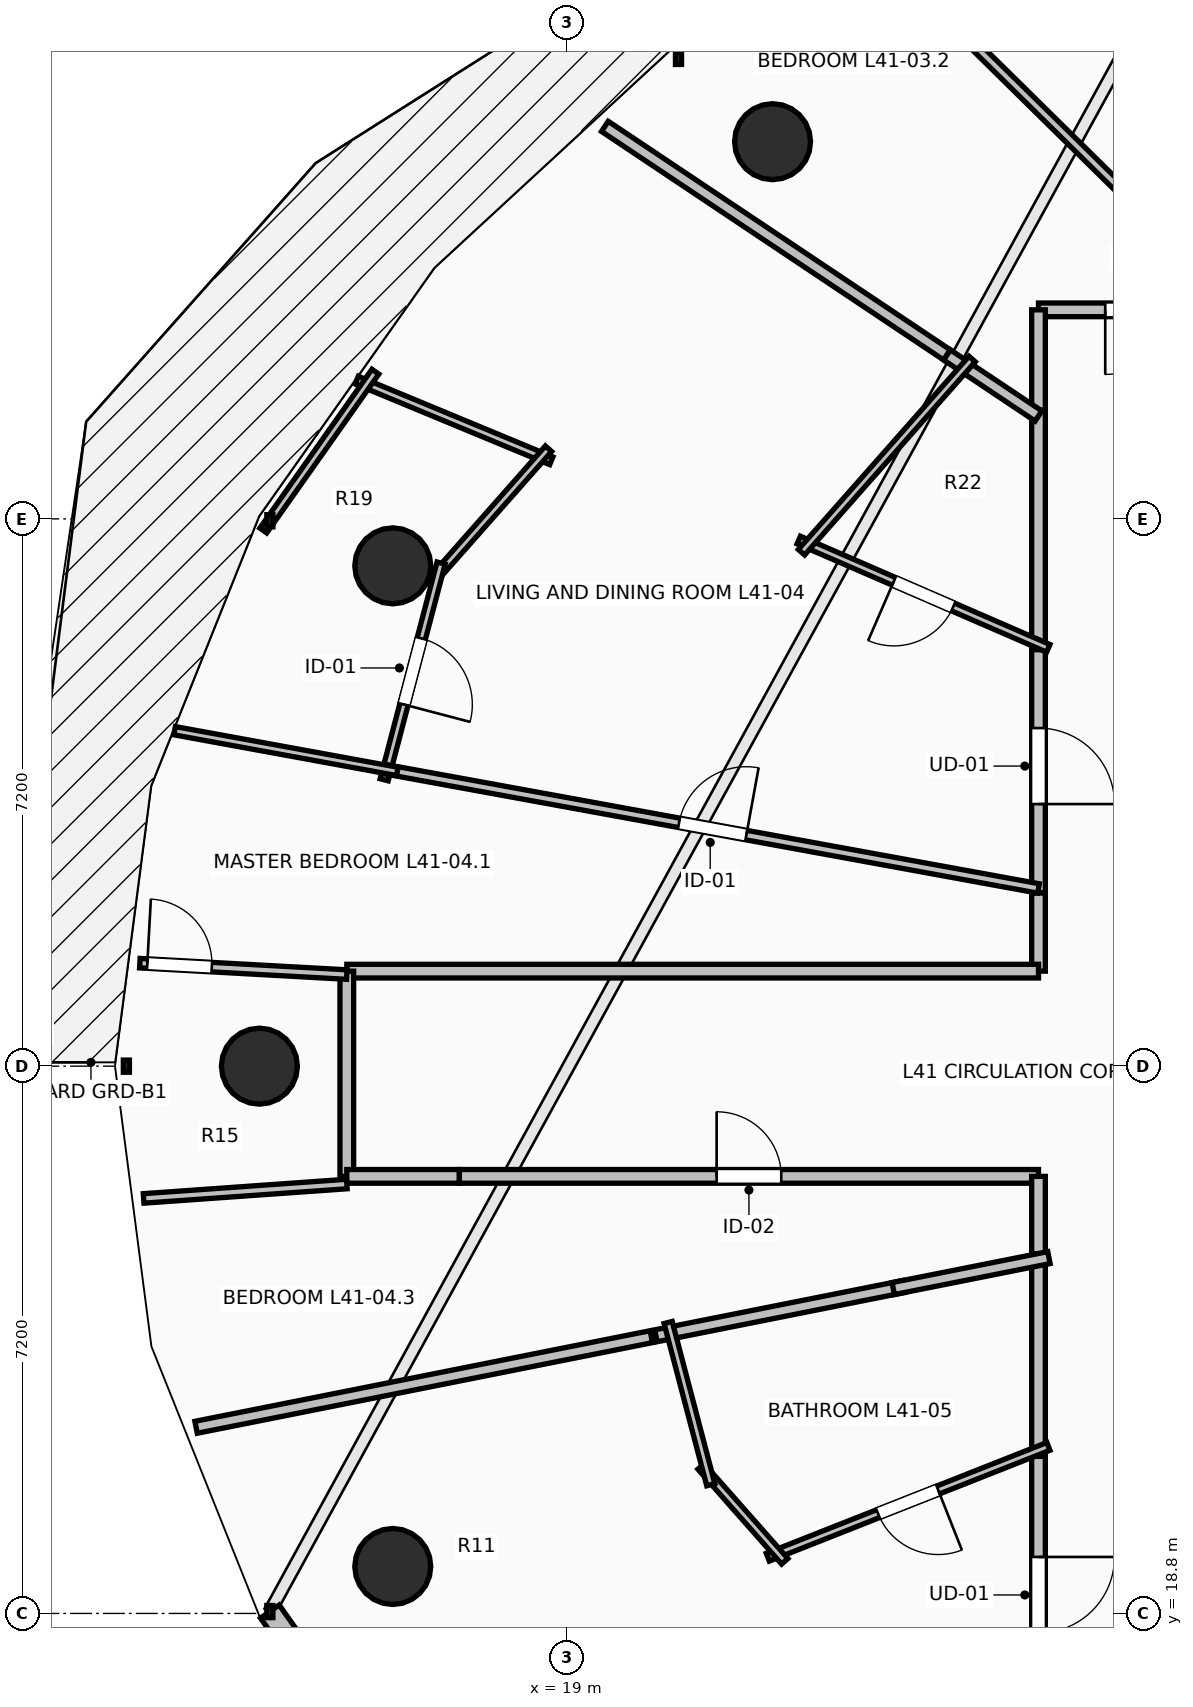
"""IFC4 building model, lengths in metres.
Left out: names, types, materials, properties, quantities, classifications, styles, units other than length and angle.
Written with IfcOpenShell. Run it as: python <this file> out.ifc"""

import sys

from ifc_helpers import new_model, si_unit, direction, frame, frame_2d, origin, origin_2d, place, context, subcontext, project, spatial, rectangle, circle, extrude, element, fill, save


model = new_model("IFC4")
c1 = context("Model", 3, precision=1e-05, world=origin(), true_north=direction((0.0, 1.0)))
c2 = subcontext(c1, "Body", "Model", "MODEL_VIEW")
j1 = project(units=[si_unit("LENGTHUNIT", "METRE"), si_unit("PLANEANGLEUNIT", "RADIAN")], contexts=[c1])
p1 = place(None, origin())
s1 = spatial("IfcSite", under=j1, at=p1, CompositionType="ELEMENT")
p2 = place(p1, origin())
s2 = spatial("IfcBuilding", under=s1, at=p2, CompositionType="ELEMENT")
p3 = place(p2, frame((0.0, 0.0, 153.6)))
s3 = spatial("IfcBuildingStorey", under=s2, at=p3, CompositionType="ELEMENT", Elevation=153.6)
for number, where, z_axis, x_axis in (
    (1, (21.701, 38.162, 0.0), (0.0, 0.0, 1.0), (-0.707, 0.707, 0.0)),
    (2, (16.705, 32.582, 0.0), (0.0, 0.0, 1.0), (-0.924, 0.383, 0.0)),
    (3, (14.95, 26.0, 0.0), (0.0, 0.0, 1.0), (-1.0, 0.0, 0.0)),
    (4, (16.705, 19.418, 0.0), (0.0, 0.0, 1.0), (-0.924, -0.383, 0.0)),
):
    element("IfcColumn", number, at=place(p3, frame(where, z_axis=z_axis, x_axis=x_axis)), inside=s3, PredefinedType="COLUMN", context=c2, shape_type="SweptSolid", body=[
        extrude(circle(Radius=0.5, at=origin_2d()), origin(), (0.0, 0.0, 1.0), 3.5),
    ])
p4 = place(p3, frame((15.088, 18.825, 0.0), z_axis=(0.0, 0.0, 1.0), x_axis=(0.577269753207, -0.816553508371, 0.0)))
e5 = element("IfcWall", 5, at=p4, inside=s3, PredefinedType="STANDARD", context=c2, shape_type="SweptSolid", body=[
    extrude(rectangle(XDim=3.97, YDim=0.3, at=frame_2d((1.985, 0.0))), origin(), (0.0, 0.0, 1.0), 3.24),
])
p5 = place(p3, frame((27.806, 35.95, 0.0), z_axis=(0.0, 0.0, 1.0), x_axis=(-1.0, 0.0, 0.0)))
e6 = element("IfcWall", 6, at=p5, inside=s3, PredefinedType="PARTITIONING", context=c2, shape_type="SweptSolid", body=[
    extrude(rectangle(XDim=2.606, YDim=0.18, at=frame_2d((1.303, 0.0))), origin(), (0.0, 0.0, 1.0), 2.432),
])
p6 = place(p5, frame((0.878, 0.0, 0.0)))
e7 = element("IfcOpeningElement", 7, at=p6, cuts=e6, PredefinedType="OPENING", context=c2, shape_type="SweptSolid", body=[
    extrude(rectangle(XDim=0.85, YDim=2.1, at=frame_2d((0.425, 1.05))), frame((0.0, 0.105, 0.0), z_axis=(0.0, -1.0, 0.0), x_axis=(1.0, 0.0, 0.0)), (0.0, 0.0, 1.0), 0.21),
])
p7 = place(p3, frame((25.2, 35.95, 0.0), z_axis=(0.0, 0.0, 1.0), x_axis=(0.0, -1.0, 0.0)))
e8 = element("IfcWall", 8, at=p7, inside=s3, PredefinedType="PARTITIONING", context=c2, shape_type="SweptSolid", body=[
    extrude(rectangle(XDim=1.457, YDim=0.18, at=frame_2d((0.729, 0.0))), origin(), (0.0, 0.0, 1.0), 2.432),
])
p8 = place(p3, frame((25.2, 31.618, 0.0), z_axis=(0.0, 0.0, 1.0), x_axis=(0.0, -1.0, 0.0)))
e9 = element("IfcWall", 9, at=p8, inside=s3, PredefinedType="PARTITIONING", context=c2, shape_type="SweptSolid", body=[
    extrude(rectangle(XDim=3.34, YDim=0.18, at=frame_2d((1.67, 0.0))), origin(), (0.0, 0.0, 1.0), 2.432),
])
p9 = place(p8, frame((1.17, 0.0, 0.0)))
e10 = element("IfcOpeningElement", 10, at=p9, cuts=e9, PredefinedType="OPENING", context=c2, shape_type="SweptSolid", body=[
    extrude(rectangle(XDim=1.0, YDim=2.15, at=frame_2d((0.5, 1.075))), frame((0.0, 0.105, 0.0), z_axis=(0.0, -1.0, 0.0), x_axis=(1.0, 0.0, 0.0)), (0.0, 0.0, 1.0), 0.21),
])
p10 = place(p3, frame((25.2, 34.633, 0.0), z_axis=(0.0, 0.0, 1.0), x_axis=(0.0, -1.0, 0.0)))
e11 = element("IfcWall", 11, at=p10, inside=s3, PredefinedType="PARTITIONING", context=c2, shape_type="SweptSolid", body=[
    extrude(rectangle(XDim=3.155, YDim=0.18, at=frame_2d((1.578, 0.0))), origin(), (0.0, 0.0, 1.0), 2.432),
])
p11 = place(p3, frame((25.2, 28.278, 0.0), z_axis=(0.0, 0.0, 1.0), x_axis=(0.0, -1.0, 0.0)))
e12 = element("IfcWall", 12, at=p11, inside=s3, PredefinedType="PARTITIONING", context=c2, shape_type="SweptSolid", body=[
    extrude(rectangle(XDim=1.028, YDim=0.18, at=frame_2d((0.514, 0.0))), origin(), (0.0, 0.0, 1.0), 2.432),
])
p12 = place(p3, frame((25.2, 27.25, 0.0), z_axis=(0.0, 0.0, 1.0), x_axis=(-1.0, 0.0, 0.0)))
e13 = element("IfcWall", 13, at=p12, inside=s3, PredefinedType="PARTITIONING", context=c2, shape_type="SweptSolid", body=[
    extrude(rectangle(XDim=9.1, YDim=0.18, at=frame_2d((4.55, 0.0))), origin(), (0.0, 0.0, 1.0), 2.432),
])
p13 = place(p3, frame((16.1, 27.25, 0.0), z_axis=(0.0, 0.0, 1.0), x_axis=(0.0, -1.0, 0.0)))
e14 = element("IfcWall", 14, at=p13, inside=s3, PredefinedType="PARTITIONING", context=c2, shape_type="SweptSolid", body=[
    extrude(rectangle(XDim=2.7, YDim=0.18, at=frame_2d((1.35, 0.0))), origin(), (0.0, 0.0, 1.0), 2.432),
])
p14 = place(p3, frame((16.1, 24.55, 0.0), z_axis=(0.0, 0.0, 1.0), x_axis=(1.0, 0.0, 0.0)))
e15 = element("IfcWall", 15, at=p14, inside=s3, PredefinedType="PARTITIONING", context=c2, shape_type="SweptSolid", body=[
    extrude(rectangle(XDim=1.481, YDim=0.18, at=frame_2d((0.74, 0.0))), origin(), (0.0, 0.0, 1.0), 3.24),
])
p15 = place(p3, frame((17.581, 24.55, 0.0), z_axis=(0.0, 0.0, 1.0), x_axis=(1.0, 0.0, 0.0)))
e16 = element("IfcWall", 16, at=p15, inside=s3, PredefinedType="PARTITIONING", context=c2, shape_type="SweptSolid", body=[
    extrude(rectangle(XDim=7.619, YDim=0.18, at=frame_2d((3.81, 0.0))), origin(), (0.0, 0.0, 1.0), 2.886),
])
p16 = place(p15, frame((3.385, 0.0, 0.0)))
e17 = element("IfcOpeningElement", 17, at=p16, cuts=e16, PredefinedType="OPENING", context=c2, shape_type="SweptSolid", body=[
    extrude(rectangle(XDim=0.85, YDim=2.1, at=frame_2d((0.425, 1.05))), frame((0.0, 0.105, 0.0), z_axis=(0.0, -1.0, 0.0), x_axis=(1.0, 0.0, 0.0)), (0.0, 0.0, 1.0), 0.21),
])
p17 = place(p3, frame((25.2, 24.55, 0.0), z_axis=(0.0, 0.0, 1.0), x_axis=(0.0, -1.0, 0.0)))
e18 = element("IfcWall", 18, at=p17, inside=s3, PredefinedType="PARTITIONING", context=c2, shape_type="SweptSolid", body=[
    extrude(rectangle(XDim=1.157, YDim=0.18, at=frame_2d((0.579, 0.0))), origin(), (0.0, 0.0, 1.0), 3.24),
])
p18 = place(p3, frame((25.2, 21.006, 0.0), z_axis=(0.0, 0.0, 1.0), x_axis=(0.0, -1.0, 0.0)))
e19 = element("IfcWall", 19, at=p18, inside=s3, PredefinedType="PARTITIONING", context=c2, shape_type="SweptSolid", body=[
    extrude(rectangle(XDim=3.926, YDim=0.18, at=frame_2d((1.963, 0.0))), origin(), (0.0, 0.0, 1.0), 2.432),
])
p19 = place(p18, frame((1.463, 0.0, 0.0)))
e20 = element("IfcOpeningElement", 20, at=p19, cuts=e19, PredefinedType="OPENING", context=c2, shape_type="SweptSolid", body=[
    extrude(rectangle(XDim=1.0, YDim=2.15, at=frame_2d((0.5, 1.075))), frame((0.0, 0.105, 0.0), z_axis=(0.0, -1.0, 0.0), x_axis=(1.0, 0.0, 0.0)), (0.0, 0.0, 1.0), 0.21),
])
p20 = place(p3, frame((25.2, 23.533, 0.0), z_axis=(0.0, 0.0, 1.0), x_axis=(0.0, -1.0, 0.0)))
e21 = element("IfcWall", 21, at=p20, inside=s3, PredefinedType="PARTITIONING", context=c2, shape_type="SweptSolid", body=[
    extrude(rectangle(XDim=2.667, YDim=0.18, at=frame_2d((1.333, 0.0))), origin(), (0.0, 0.0, 1.0), 3.24),
])
p21 = place(p3, frame((22.96, 40.806, 0.0), z_axis=(0.0, 0.0, 1.0), x_axis=(0.712587980465, -0.70158276069, 0.0)))
e22 = element("IfcWall", 22, at=p21, inside=s3, PredefinedType="PARTITIONING", context=c2, shape_type="SweptSolid", body=[
    extrude(rectangle(XDim=6.921, YDim=0.125, at=frame_2d((3.461, 0.0))), origin(), (0.0, 0.0, 1.0), 2.432),
])
p22 = place(p3, frame((23.995, 35.358, 0.0), z_axis=(0.0, 0.0, 1.0), x_axis=(0.831505536539, -0.555516464837, 0.0)))
e23 = element("IfcWall", 23, at=p22, inside=s3, PredefinedType="PARTITIONING", context=c2, shape_type="SweptSolid", body=[
    extrude(rectangle(XDim=1.449, YDim=0.16, at=frame_2d((0.725, 0.0))), origin(), (0.0, 0.0, 1.0), 3.24),
])
p23 = place(p3, frame((19.495, 38.364, 0.0), z_axis=(0.0, 0.0, 1.0), x_axis=(0.831529389247, -0.55548076008, 0.0)))
e24 = element("IfcWall", 24, at=p23, inside=s3, PredefinedType="PARTITIONING", context=c2, shape_type="SweptSolid", body=[
    extrude(rectangle(XDim=5.412, YDim=0.16, at=frame_2d((2.706, 0.0))), origin(), (0.0, 0.0, 1.0), 2.728),
])
p24 = place(p3, frame((25.328, 31.497, 0.0), z_axis=(0.0, 0.0, 1.0), x_axis=(-0.917371334891, 0.398032453351, 0.0)))
e25 = element("IfcWall", 25, at=p24, inside=s3, PredefinedType="PARTITIONING", context=c2, shape_type="SweptSolid", body=[
    extrude(rectangle(XDim=3.578, YDim=0.11, at=frame_2d((1.789, 0.0))), origin(), (0.0, 0.0, 1.0), 2.886),
])
p25 = place(p24, frame((1.364, 0.0, 0.0)))
e26 = element("IfcOpeningElement", 26, at=p25, cuts=e25, PredefinedType="OPENING", context=c2, shape_type="SweptSolid", body=[
    extrude(rectangle(XDim=0.85, YDim=2.1, at=frame_2d((0.425, 1.05))), frame((0.0, 0.07, 0.0), z_axis=(0.0, -1.0, 0.0), x_axis=(1.0, 0.0, 0.0)), (0.0, 0.0, 1.0), 0.14),
])
p26 = place(p3, frame((22.081, 32.761, 0.0), z_axis=(0.0, 0.0, 1.0), x_axis=(0.662023888113, 0.749482736004, 0.0)))
e27 = element("IfcWall", 27, at=p26, inside=s3, PredefinedType="PARTITIONING", context=c2, shape_type="SweptSolid", body=[
    extrude(rectangle(XDim=3.392, YDim=0.11, at=frame_2d((1.696, 0.0))), origin(), (0.0, 0.0, 1.0), 3.24),
])
p27 = place(p3, frame((16.231, 35.026, 0.0), z_axis=(0.0, 0.0, 1.0), x_axis=(0.923742873908, -0.383013188943, 0.0)))
e28 = element("IfcWall", 28, at=p27, inside=s3, PredefinedType="PARTITIONING", context=c2, shape_type="SweptSolid", body=[
    extrude(rectangle(XDim=2.771, YDim=0.11, at=frame_2d((1.385, 0.0))), origin(), (0.0, 0.0, 1.0), 2.728),
])
p28 = place(p3, frame((18.754, 34.123, 0.0), z_axis=(0.0, 0.0, 1.0), x_axis=(-0.66207590595, -0.749436785033, 0.0)))
e29 = element("IfcWall", 29, at=p28, inside=s3, PredefinedType="PARTITIONING", context=c2, shape_type="SweptSolid", body=[
    extrude(rectangle(XDim=2.328, YDim=0.11, at=frame_2d((1.164, 0.0))), origin(), (0.0, 0.0, 1.0), 2.432),
])
p29 = place(p3, frame((17.341, 32.618, 0.0), z_axis=(0.0, 0.0, 1.0), x_axis=(-0.254191595923, -0.967153882566, 0.0)))
e30 = element("IfcWall", 30, at=p29, inside=s3, PredefinedType="PARTITIONING", context=c2, shape_type="SweptSolid", body=[
    extrude(rectangle(XDim=2.948, YDim=0.11, at=frame_2d((1.474, 0.0))), origin(), (0.0, 0.0, 1.0), 2.432),
])
p30 = place(p29, frame((1.024, 0.0, 0.0)))
e31 = element("IfcOpeningElement", 31, at=p30, cuts=e30, PredefinedType="OPENING", context=c2, shape_type="SweptSolid", body=[
    extrude(rectangle(XDim=0.9, YDim=2.1, at=frame_2d((0.45, 1.05))), frame((0.0, 0.07, 0.0), z_axis=(0.0, -1.0, 0.0), x_axis=(1.0, 0.0, 0.0)), (0.0, 0.0, 1.0), 0.14),
])
p31 = place(p3, frame((16.476, 35.136, 0.0), z_axis=(0.0, 0.0, 1.0), x_axis=(-0.576469555269, -0.81711862777, 0.0)))
e32 = element("IfcWall", 32, at=p31, inside=s3, PredefinedType="PARTITIONING", context=c2, shape_type="SweptSolid", body=[
    extrude(rectangle(XDim=2.558, YDim=0.11, at=frame_2d((1.279, 0.0))), origin(), (0.0, 0.0, 1.0), 3.24),
])
p32 = place(p3, frame((16.627, 29.903, 0.0), z_axis=(0.0, 0.0, 1.0), x_axis=(0.983739211704, -0.179602793286, 0.0)))
e33 = element("IfcWall", 33, at=p32, inside=s3, PredefinedType="PARTITIONING", context=c2, shape_type="SweptSolid", body=[
    extrude(rectangle(XDim=8.715, YDim=0.125, at=frame_2d((4.357, 0.0))), origin(), (0.0, 0.0, 1.0), 2.886),
])
p33 = place(p32, frame((3.907, 0.0, 0.0)))
e34 = element("IfcOpeningElement", 34, at=p33, cuts=e33, PredefinedType="OPENING", context=c2, shape_type="SweptSolid", body=[
    extrude(rectangle(XDim=0.9, YDim=2.1, at=frame_2d((0.45, 1.05))), frame((0.0, 0.077, 0.0), z_axis=(0.0, -1.0, 0.0), x_axis=(1.0, 0.0, 0.0)), (0.0, 0.0, 1.0), 0.155),
])
p34 = place(p3, frame((13.834, 30.413, 0.0), z_axis=(0.0, 0.0, 1.0), x_axis=(0.983716126889, -0.179729189891, 0.0)))
e35 = element("IfcWall", 35, at=p34, inside=s3, PredefinedType="PARTITIONING", context=c2, shape_type="SweptSolid", body=[
    extrude(rectangle(XDim=2.979, YDim=0.11, at=frame_2d((1.49, 0.0))), origin(), (0.0, 0.0, 1.0), 2.728),
])
p35 = place(p3, frame((13.377, 27.355, 0.0), z_axis=(0.0, 0.0, 1.0), x_axis=(0.998488320145, -0.054964302364, 0.0)))
e36 = element("IfcWall", 36, at=p35, inside=s3, PredefinedType="PARTITIONING", context=c2, shape_type="SweptSolid", body=[
    extrude(rectangle(XDim=2.727, YDim=0.125, at=frame_2d((1.364, 0.0))), origin(), (0.0, 0.0, 1.0), 2.728),
])
p36 = place(p35, frame((0.099, 0.0, 0.0)))
e37 = element("IfcOpeningElement", 37, at=p36, cuts=e36, PredefinedType="OPENING", context=c2, shape_type="SweptSolid", body=[
    extrude(rectangle(XDim=0.85, YDim=2.1, at=frame_2d((0.425, 1.05))), frame((0.0, 0.077, 0.0), z_axis=(0.0, -1.0, 0.0), x_axis=(1.0, 0.0, 0.0)), (0.0, 0.0, 1.0), 0.155),
])
p37 = place(p3, frame((13.427, 24.26, 0.0), z_axis=(0.0, 0.0, 1.0), x_axis=(0.997504277417, 0.070606065851, 0.0)))
e38 = element("IfcWall", 38, at=p37, inside=s3, PredefinedType="PARTITIONING", context=c2, shape_type="SweptSolid", body=[
    extrude(rectangle(XDim=2.68, YDim=0.125, at=frame_2d((1.34, 0.0))), origin(), (0.0, 0.0, 1.0), 2.728),
])
p38 = place(p3, frame((14.117, 21.249, 0.0), z_axis=(0.0, 0.0, 1.0), x_axis=(0.980766298352, 0.19518572698, 0.0)))
e39 = element("IfcWall", 39, at=p38, inside=s3, PredefinedType="PARTITIONING", context=c2, shape_type="SweptSolid", body=[
    extrude(rectangle(XDim=6.106, YDim=0.16, at=frame_2d((3.053, 0.0))), origin(), (0.0, 0.0, 1.0), 2.728),
])
p39 = place(p3, frame((20.167, 22.453, 0.0), z_axis=(0.0, 0.0, 1.0), x_axis=(0.980766708229, 0.195183667423, 0.0)))
e40 = element("IfcWall", 40, at=p39, inside=s3, PredefinedType="PARTITIONING", context=c2, shape_type="SweptSolid", body=[
    extrude(rectangle(XDim=3.323, YDim=0.16, at=frame_2d((1.662, 0.0))), origin(), (0.0, 0.0, 1.0), 2.972),
])
p40 = place(p3, frame((23.289, 23.074, 0.0), z_axis=(0.0, 0.0, 1.0), x_axis=(0.980804842296, 0.194991951961, 0.0)))
e41 = element("IfcWall", 41, at=p40, inside=s3, PredefinedType="PARTITIONING", context=c2, shape_type="SweptSolid", body=[
    extrude(rectangle(XDim=2.088, YDim=0.16, at=frame_2d((1.044, 0.0))), origin(), (0.0, 0.0, 1.0), 2.886),
])
p41 = place(p3, frame((25.33, 20.997, 0.0), z_axis=(0.0, 0.0, 1.0), x_axis=(-0.930092731386, -0.367324803169, 0.0)))
e42 = element("IfcWall", 42, at=p41, inside=s3, PredefinedType="PARTITIONING", context=c2, shape_type="SweptSolid", body=[
    extrude(rectangle(XDim=3.969, YDim=0.11, at=frame_2d((1.984, 0.0))), origin(), (0.0, 0.0, 1.0), 2.886),
])
p42 = place(p41, frame((1.559, 0.0, 0.0)))
e43 = element("IfcOpeningElement", 43, at=p42, cuts=e42, PredefinedType="OPENING", context=c2, shape_type="SweptSolid", body=[
    extrude(rectangle(XDim=0.85, YDim=2.1, at=frame_2d((0.425, 1.05))), frame((0.0, 0.07, 0.0), z_axis=(0.0, -1.0, 0.0), x_axis=(1.0, 0.0, 0.0)), (0.0, 0.0, 1.0), 0.14),
])
p43 = place(p3, frame((21.862, 19.486, 0.0), z_axis=(0.0, 0.0, 1.0), x_axis=(-0.661645897528, 0.749816448396, 0.0)))
e44 = element("IfcWall", 44, at=p43, inside=s3, PredefinedType="PARTITIONING", context=c2, shape_type="SweptSolid", body=[
    extrude(rectangle(XDim=1.664, YDim=0.11, at=frame_2d((0.832, 0.0))), origin(), (0.0, 0.0, 1.0), 3.24),
])
p44 = place(p3, frame((20.889, 20.494, 0.0), z_axis=(0.0, 0.0, 1.0), x_axis=(-0.254389812051, 0.967101764823, 0.0)))
e45 = element("IfcWall", 45, at=p44, inside=s3, PredefinedType="PARTITIONING", context=c2, shape_type="SweptSolid", body=[
    extrude(rectangle(XDim=2.206, YDim=0.11, at=frame_2d((1.103, 0.0))), origin(), (0.0, 0.0, 1.0), 3.24),
])
p45 = place(p9, origin())
e46 = element("IfcDoor", 46, at=p45, inside=s3, OperationType="SINGLE_SWING_RIGHT", PredefinedType="DOOR", context=c2, shape_type="SweptSolid", body=[
    extrude(rectangle(XDim=1.0, YDim=2.15, at=frame_2d((0.5, 1.075))), frame((0.0, 0.025, 0.0), z_axis=(0.0, -1.0, 0.0), x_axis=(1.0, 0.0, 0.0)), (0.0, 0.0, 1.0), 0.05),
])
fill(e10, e46)
p46 = place(p19, origin())
e47 = element("IfcDoor", 47, at=p46, inside=s3, OperationType="SINGLE_SWING_LEFT", PredefinedType="DOOR", context=c2, shape_type="SweptSolid", body=[
    extrude(rectangle(XDim=1.0, YDim=2.15, at=frame_2d((0.5, 1.075))), frame((0.0, 0.025, 0.0), z_axis=(0.0, -1.0, 0.0), x_axis=(1.0, 0.0, 0.0)), (0.0, 0.0, 1.0), 0.05),
])
fill(e20, e47)
p47 = place(p25, origin())
e48 = element("IfcDoor", 48, at=p47, inside=s3, OperationType="SINGLE_SWING_RIGHT", PredefinedType="DOOR", context=c2, shape_type="SweptSolid", body=[
    extrude(rectangle(XDim=0.85, YDim=2.1, at=frame_2d((0.425, 1.05))), frame((0.0, 0.025, 0.0), z_axis=(0.0, -1.0, 0.0), x_axis=(1.0, 0.0, 0.0)), (0.0, 0.0, 1.0), 0.05),
])
fill(e26, e48)
p48 = place(p30, origin())
e49 = element("IfcDoor", 49, at=p48, inside=s3, OperationType="SINGLE_SWING_RIGHT", PredefinedType="DOOR", context=c2, shape_type="SweptSolid", body=[
    extrude(rectangle(XDim=0.9, YDim=2.1, at=frame_2d((0.45, 1.05))), frame((0.0, 0.025, 0.0), z_axis=(0.0, -1.0, 0.0), x_axis=(1.0, 0.0, 0.0)), (0.0, 0.0, 1.0), 0.05),
])
fill(e31, e49)
p49 = place(p33, origin())
e50 = element("IfcDoor", 50, at=p49, inside=s3, OperationType="SINGLE_SWING_RIGHT", PredefinedType="DOOR", context=c2, shape_type="SweptSolid", body=[
    extrude(rectangle(XDim=0.9, YDim=2.1, at=frame_2d((0.45, 1.05))), frame((0.0, 0.025, 0.0), z_axis=(0.0, -1.0, 0.0), x_axis=(1.0, 0.0, 0.0)), (0.0, 0.0, 1.0), 0.05),
])
fill(e34, e50)
p50 = place(p42, origin())
e51 = element("IfcDoor", 51, at=p50, inside=s3, OperationType="SINGLE_SWING_LEFT", PredefinedType="DOOR", context=c2, shape_type="SweptSolid", body=[
    extrude(rectangle(XDim=0.85, YDim=2.1, at=frame_2d((0.425, 1.05))), frame((0.0, 0.025, 0.0), z_axis=(0.0, -1.0, 0.0), x_axis=(1.0, 0.0, 0.0)), (0.0, 0.0, 1.0), 0.05),
])
fill(e43, e51)
p51 = place(p6, origin())
e52 = element("IfcDoor", 52, at=p51, inside=s3, OperationType="SINGLE_SWING_RIGHT", PredefinedType="DOOR", context=c2, shape_type="SweptSolid", body=[
    extrude(rectangle(XDim=0.85, YDim=2.1, at=frame_2d((0.425, 1.05))), frame((0.0, 0.025, 0.0), z_axis=(0.0, -1.0, 0.0), x_axis=(1.0, 0.0, 0.0)), (0.0, 0.0, 1.0), 0.05),
])
fill(e7, e52)
p52 = place(p16, origin())
e53 = element("IfcDoor", 53, at=p52, inside=s3, OperationType="SINGLE_SWING_LEFT", PredefinedType="DOOR", context=c2, shape_type="SweptSolid", body=[
    extrude(rectangle(XDim=0.85, YDim=2.1, at=frame_2d((0.425, 1.05))), frame((0.0, 0.025, 0.0), z_axis=(0.0, -1.0, 0.0), x_axis=(1.0, 0.0, 0.0)), (0.0, 0.0, 1.0), 0.05),
])
fill(e17, e53)
p53 = place(p36, origin())
e54 = element("IfcDoor", 54, at=p53, inside=s3, OperationType="SINGLE_SWING_LEFT", PredefinedType="DOOR", context=c2, shape_type="SweptSolid", body=[
    extrude(rectangle(XDim=0.85, YDim=2.1, at=frame_2d((0.425, 1.05))), frame((0.0, 0.025, 0.0), z_axis=(0.0, -1.0, 0.0), x_axis=(1.0, 0.0, 0.0)), (0.0, 0.0, 1.0), 0.05),
])
fill(e37, e54)
save(model, sys.argv[1])
